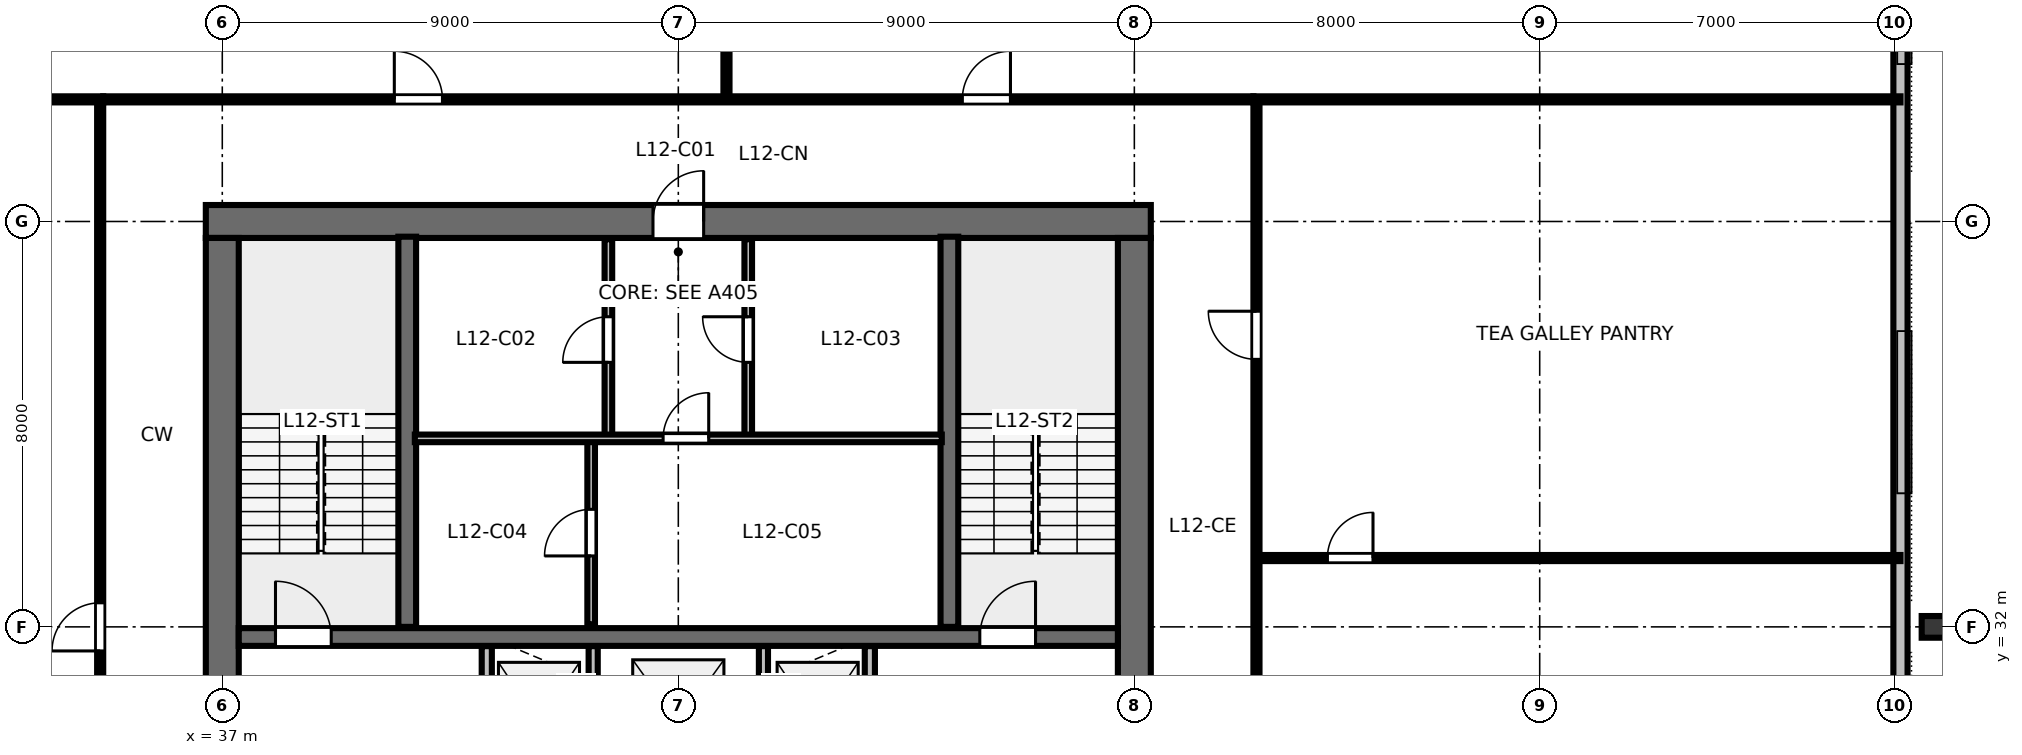
"""IFC4 building model, lengths in metres.
Left out: names, types, materials, properties, quantities, classifications, styles, units other than length and angle.
Written with IfcOpenShell. Run it as: python <this file> out.ifc"""

import sys

from ifc_helpers import new_model, si_unit, direction, frame, frame_2d, origin, origin_2d, place, context, subcontext, project, spatial, rectangle, i_section, extrude, element, fill, save


model = new_model("IFC4")
c1 = context("Model", 3, precision=1e-05, world=origin(), true_north=direction((0.0, 1.0)))
c2 = subcontext(c1, "Body", "Model", "MODEL_VIEW")
j1 = project(units=[si_unit("LENGTHUNIT", "METRE"), si_unit("PLANEANGLEUNIT", "RADIAN")], contexts=[c1])
p1 = place(None, origin())
s1 = spatial("IfcSite", under=j1, at=p1, CompositionType="ELEMENT")
p2 = place(p1, origin())
s2 = spatial("IfcBuilding", under=s1, at=p2, CompositionType="ELEMENT")
p3 = place(p2, frame((0.0, 0.0, 49.6)))
s3 = spatial("IfcBuildingStorey", under=s2, at=p3, CompositionType="ELEMENT", Elevation=49.6)
p4 = place(p3, frame((36.675, 40.0, 0.0), z_axis=(0.0, 0.0, 1.0), x_axis=(1.0, 0.0, 0.0)))
e1 = element("IfcWall", 1, at=p4, inside=s3, PredefinedType="SHEAR", context=c2, shape_type="SweptSolid", body=[
    extrude(rectangle(XDim=18.65, YDim=0.65, at=frame_2d((9.325, 0.0))), origin(), (0.0, 0.0, 1.0), 3.36),
])
p5 = place(p4, frame((8.825, 0.0, 0.0)))
e2 = element("IfcOpeningElement", 2, at=p5, cuts=e1, PredefinedType="OPENING", context=c2, shape_type="SweptSolid", body=[
    extrude(rectangle(XDim=1.0, YDim=2.15, at=frame_2d((0.5, 1.075))), frame((0.0, 0.335, 0.0), z_axis=(0.0, -1.0, 0.0), x_axis=(1.0, 0.0, 0.0)), (0.0, 0.0, 1.0), 0.67),
])
p6 = place(p3, frame((37.0, 24.325, 0.0), z_axis=(0.0, 0.0, 1.0), x_axis=(0.0, 1.0, 0.0)))
e3 = element("IfcWall", 3, at=p6, inside=s3, PredefinedType="SHEAR", context=c2, shape_type="SweptSolid", body=[
    extrude(rectangle(XDim=15.35, YDim=0.65, at=frame_2d((7.675, 0.0))), origin(), (0.0, 0.0, 1.0), 3.36),
])
p7 = place(p6, frame((5.2, 0.0, 0.0)))
e4 = element("IfcOpeningElement", 4, at=p7, cuts=e3, PredefinedType="OPENING", context=c2, shape_type="SweptSolid", body=[
    extrude(rectangle(XDim=1.15, YDim=2.15, at=frame_2d((0.575, 1.075))), frame((0.0, 0.335, 0.0), z_axis=(0.0, -1.0, 0.0), x_axis=(1.0, 0.0, 0.0)), (0.0, 0.0, 1.0), 0.67),
])
p8 = place(p3, frame((55.0, 24.325, 0.0), z_axis=(0.0, 0.0, 1.0), x_axis=(0.0, 1.0, 0.0)))
e5 = element("IfcWall", 5, at=p8, inside=s3, PredefinedType="SHEAR", context=c2, shape_type="SweptSolid", body=[
    extrude(rectangle(XDim=15.35, YDim=0.65, at=frame_2d((7.675, 0.0))), origin(), (0.0, 0.0, 1.0), 3.36),
])
p9 = place(p8, frame((5.2, 0.0, 0.0)))
e6 = element("IfcOpeningElement", 6, at=p9, cuts=e5, PredefinedType="OPENING", context=c2, shape_type="SweptSolid", body=[
    extrude(rectangle(XDim=1.15, YDim=2.15, at=frame_2d((0.575, 1.075))), frame((0.0, 0.335, 0.0), z_axis=(0.0, -1.0, 0.0), x_axis=(1.0, 0.0, 0.0)), (0.0, 0.0, 1.0), 0.67),
])
p10 = place(p3, frame((37.325, 31.8, 0.0), z_axis=(0.0, 0.0, 1.0), x_axis=(1.0, 0.0, 0.0)))
e7 = element("IfcWall", 7, at=p10, inside=s3, PredefinedType="SHEAR", context=c2, shape_type="SweptSolid", body=[
    extrude(rectangle(XDim=17.35, YDim=0.35, at=frame_2d((8.675, 0.0))), origin(), (0.0, 0.0, 1.0), 3.36),
])
p11 = place(p10, frame((0.725, 0.0, 0.0)))
e8 = element("IfcOpeningElement", 8, at=p11, cuts=e7, PredefinedType="OPENING", context=c2, shape_type="SweptSolid", body=[
    extrude(rectangle(XDim=1.1, YDim=2.15, at=frame_2d((0.55, 1.075))), frame((0.0, 0.185, 0.0), z_axis=(0.0, -1.0, 0.0), x_axis=(1.0, 0.0, 0.0)), (0.0, 0.0, 1.0), 0.37),
])
p12 = place(p10, frame((14.625, 0.0, 0.0)))
e9 = element("IfcOpeningElement", 9, at=p12, cuts=e7, PredefinedType="OPENING", context=c2, shape_type="SweptSolid", body=[
    extrude(rectangle(XDim=1.1, YDim=2.15, at=frame_2d((0.55, 1.075))), frame((0.0, 0.185, 0.0), z_axis=(0.0, -1.0, 0.0), x_axis=(1.0, 0.0, 0.0)), (0.0, 0.0, 1.0), 0.37),
])
p13 = place(p3, frame((70.78, 32.0, 0.0), z_axis=(0.0, 0.0, 1.0), x_axis=(0.0, 1.0, 0.0)))
e10 = element("IfcColumn", 10, at=p13, inside=s3, PredefinedType="COLUMN", context=c2, shape_type="SweptSolid", body=[
    extrude(i_section(OverallWidth=0.428, OverallDepth=0.483, WebThickness=0.051, FlangeThickness=0.082, FilletRadius=0.025, at=origin_2d()), origin(), (0.0, 0.0, 1.0), 3.358),
])
p14 = place(p3, frame((70.12, 14.16, 0.0), z_axis=(0.0, 0.0, 1.0), x_axis=(0.0, 1.0, 0.0)))
e11 = element("IfcWall", 11, at=p14, inside=s3, PredefinedType="STANDARD", context=c2, shape_type="SweptSolid", body=[
    extrude(rectangle(XDim=35.68, YDim=0.28, at=frame_2d((17.84, 0.0))), origin(), (0.0, 0.0, 1.0), 3.36),
])
for number, where, z_axis, x_axis in (
    (12, (40.65, 32.0, 0.0), (0.0, 0.0, 1.0), (0.0, 1.0, 0.0)),
    (13, (51.35, 32.0, 0.0), (0.0, 0.0, 1.0), (0.0, 1.0, 0.0)),
):
    element("IfcWall", number, at=place(p3, frame(where, z_axis=z_axis, x_axis=x_axis)), inside=s3, PredefinedType="SHEAR", context=c2, shape_type="SweptSolid", body=[
        extrude(rectangle(XDim=7.7, YDim=0.35, at=frame_2d((3.85, 0.0))), origin(), (0.0, 0.0, 1.0), 3.6),
    ])
p15 = place(p3, frame((44.62, 35.72, 0.0), z_axis=(0.0, 0.0, 1.0), x_axis=(0.0, 1.0, 0.0)))
e14 = element("IfcWall", 14, at=p15, inside=s3, PredefinedType="PARTITIONING", context=c2, shape_type="SweptSolid", body=[
    extrude(rectangle(XDim=3.93, YDim=0.15, at=frame_2d((1.965, 0.0))), origin(), (0.0, 0.0, 1.0), 3.36),
])
p16 = place(p15, frame((1.5, 0.0, 0.0)))
e15 = element("IfcOpeningElement", 15, at=p16, cuts=e14, PredefinedType="OPENING", context=c2, shape_type="SweptSolid", body=[
    extrude(rectangle(XDim=0.9, YDim=2.15, at=frame_2d((0.45, 1.075))), frame((0.0, 0.085, 0.0), z_axis=(0.0, -1.0, 0.0), x_axis=(1.0, 0.0, 0.0)), (0.0, 0.0, 1.0), 0.17),
])
p17 = place(p3, frame((47.38, 35.72, 0.0), z_axis=(0.0, 0.0, 1.0), x_axis=(0.0, 1.0, 0.0)))
e16 = element("IfcWall", 16, at=p17, inside=s3, PredefinedType="PARTITIONING", context=c2, shape_type="SweptSolid", body=[
    extrude(rectangle(XDim=3.93, YDim=0.15, at=frame_2d((1.965, 0.0))), origin(), (0.0, 0.0, 1.0), 3.36),
])
p18 = place(p17, frame((1.5, 0.0, 0.0)))
e17 = element("IfcOpeningElement", 17, at=p18, cuts=e16, PredefinedType="OPENING", context=c2, shape_type="SweptSolid", body=[
    extrude(rectangle(XDim=0.9, YDim=2.15, at=frame_2d((0.45, 1.075))), frame((0.0, 0.085, 0.0), z_axis=(0.0, -1.0, 0.0), x_axis=(1.0, 0.0, 0.0)), (0.0, 0.0, 1.0), 0.17),
])
p19 = place(p3, frame((44.28, 32.05, 0.0), z_axis=(0.0, 0.0, 1.0), x_axis=(0.0, 1.0, 0.0)))
e18 = element("IfcWall", 18, at=p19, inside=s3, PredefinedType="PARTITIONING", context=c2, shape_type="SweptSolid", body=[
    extrude(rectangle(XDim=3.67, YDim=0.15, at=frame_2d((1.835, 0.0))), origin(), (0.0, 0.0, 1.0), 3.36),
])
p20 = place(p19, frame((1.35, 0.0, 0.0)))
e19 = element("IfcOpeningElement", 19, at=p20, cuts=e18, PredefinedType="OPENING", context=c2, shape_type="SweptSolid", body=[
    extrude(rectangle(XDim=0.92, YDim=2.15, at=frame_2d((0.46, 1.075))), frame((0.0, 0.085, 0.0), z_axis=(0.0, -1.0, 0.0), x_axis=(1.0, 0.0, 0.0)), (0.0, 0.0, 1.0), 0.17),
])
p21 = place(p3, frame((40.8, 35.72, 0.0), z_axis=(0.0, 0.0, 1.0), x_axis=(1.0, 0.0, 0.0)))
e20 = element("IfcWall", 20, at=p21, inside=s3, PredefinedType="PARTITIONING", context=c2, shape_type="SweptSolid", body=[
    extrude(rectangle(XDim=10.4, YDim=0.15, at=frame_2d((5.2, 0.0))), origin(), (0.0, 0.0, 1.0), 3.36),
])
p22 = place(p21, frame((4.9, 0.0, 0.0)))
e21 = element("IfcOpeningElement", 21, at=p22, cuts=e20, PredefinedType="OPENING", context=c2, shape_type="SweptSolid", body=[
    extrude(rectangle(XDim=0.9, YDim=2.15, at=frame_2d((0.45, 1.075))), frame((0.0, 0.085, 0.0), z_axis=(0.0, -1.0, 0.0), x_axis=(1.0, 0.0, 0.0)), (0.0, 0.0, 1.0), 0.17),
])
p23 = place(p3, frame((42.22, 28.58, 0.0), z_axis=(0.0, 0.0, 1.0), x_axis=(0.0, 1.0, 0.0)))
e22 = element("IfcWall", 22, at=p23, inside=s3, PredefinedType="PARTITIONING", context=c2, shape_type="SweptSolid", body=[
    extrude(rectangle(XDim=3.04, YDim=0.2, at=frame_2d((1.52, 0.0))), origin(), (0.0, 0.0, 1.0), 3.36),
])
p24 = place(p23, frame((0.95, 0.0, 0.0)))
e23 = element("IfcOpeningElement", 23, at=p24, cuts=e22, PredefinedType="OPENING", context=c2, shape_type="SweptSolid", body=[
    extrude(rectangle(XDim=1.05, YDim=2.15, at=frame_2d((0.525, 1.075))), frame((0.0, 0.11, 0.0), z_axis=(0.0, -1.0, 0.0), x_axis=(1.0, 0.0, 0.0)), (0.0, 0.0, 1.0), 0.22),
])
p25 = place(p3, frame((49.78, 28.58, 0.0), z_axis=(0.0, 0.0, 1.0), x_axis=(0.0, 1.0, 0.0)))
e24 = element("IfcWall", 24, at=p25, inside=s3, PredefinedType="PARTITIONING", context=c2, shape_type="SweptSolid", body=[
    extrude(rectangle(XDim=3.04, YDim=0.2, at=frame_2d((1.52, 0.0))), origin(), (0.0, 0.0, 1.0), 3.36),
])
p26 = place(p25, frame((0.95, 0.0, 0.0)))
e25 = element("IfcOpeningElement", 25, at=p26, cuts=e24, PredefinedType="OPENING", context=c2, shape_type="SweptSolid", body=[
    extrude(rectangle(XDim=1.05, YDim=2.15, at=frame_2d((0.525, 1.075))), frame((0.0, 0.11, 0.0), z_axis=(0.0, -1.0, 0.0), x_axis=(1.0, 0.0, 0.0)), (0.0, 0.0, 1.0), 0.22),
])
for number, where, z_axis, x_axis in (
    (26, (44.32, 28.58, 0.0), (0.0, 0.0, 1.0), (0.0, 1.0, 0.0)),
    (27, (47.68, 28.58, 0.0), (0.0, 0.0, 1.0), (0.0, 1.0, 0.0)),
):
    element("IfcWall", number, at=place(p3, frame(where, z_axis=z_axis, x_axis=x_axis)), inside=s3, PredefinedType="PARTITIONING", context=c2, shape_type="SweptSolid", body=[
        extrude(rectangle(XDim=3.04, YDim=0.18, at=frame_2d((1.52, 0.0))), origin(), (0.0, 0.0, 1.0), 3.36),
    ])
p27 = place(p3, frame((46.95, 42.41, 0.0), z_axis=(0.0, 0.0, 1.0), x_axis=(0.0, 1.0, 0.0)))
e28 = element("IfcWall", 28, at=p27, inside=s3, PredefinedType="PARTITIONING", context=c2, shape_type="SweptSolid", body=[
    extrude(rectangle(XDim=10.81, YDim=0.12, at=frame_2d((5.405, 0.0))), origin(), (0.0, 0.0, 1.0), 2.64),
])
p28 = place(p27, frame((1.4, 0.0, 0.0)))
e29 = element("IfcOpeningElement", 29, at=p28, cuts=e28, PredefinedType="OPENING", context=c2, shape_type="SweptSolid", body=[
    extrude(rectangle(XDim=0.9, YDim=2.15, at=frame_2d((0.45, 1.075))), frame((0.0, 0.07, 0.0), z_axis=(0.0, -1.0, 0.0), x_axis=(1.0, 0.0, 0.0)), (0.0, 0.0, 1.0), 0.14),
])
p29 = place(p3, frame((34.65, 42.41, 0.0), z_axis=(0.0, 0.0, 1.0), x_axis=(1.0, 0.0, 0.0)))
e30 = element("IfcWall", 30, at=p29, inside=s3, PredefinedType="PARTITIONING", context=c2, shape_type="SweptSolid", body=[
    extrude(rectangle(XDim=22.7, YDim=0.12, at=frame_2d((11.35, 0.0))), origin(), (0.0, 0.0, 1.0), 2.64),
])
p30 = place(p29, frame((5.745, 0.0, 0.0)))
e31 = element("IfcOpeningElement", 31, at=p30, cuts=e30, PredefinedType="OPENING", context=c2, shape_type="SweptSolid", body=[
    extrude(rectangle(XDim=0.95, YDim=2.15, at=frame_2d((0.475, 1.075))), frame((0.0, 0.07, 0.0), z_axis=(0.0, -1.0, 0.0), x_axis=(1.0, 0.0, 0.0)), (0.0, 0.0, 1.0), 0.14),
])
p31 = place(p29, frame((16.955, 0.0, 0.0)))
e32 = element("IfcOpeningElement", 32, at=p31, cuts=e30, PredefinedType="OPENING", context=c2, shape_type="SweptSolid", body=[
    extrude(rectangle(XDim=0.95, YDim=2.15, at=frame_2d((0.475, 1.075))), frame((0.0, 0.07, 0.0), z_axis=(0.0, -1.0, 0.0), x_axis=(1.0, 0.0, 0.0)), (0.0, 0.0, 1.0), 0.14),
])
p32 = place(p3, frame((34.59, 21.65, 0.0), z_axis=(0.0, 0.0, 1.0), x_axis=(0.0, 1.0, 0.0)))
e33 = element("IfcWall", 33, at=p32, inside=s3, PredefinedType="PARTITIONING", context=c2, shape_type="SweptSolid", body=[
    extrude(rectangle(XDim=20.7, YDim=0.12, at=frame_2d((10.35, 0.0))), origin(), (0.0, 0.0, 1.0), 2.64),
])
p33 = place(p32, frame((9.875, 0.0, 0.0)))
e34 = element("IfcOpeningElement", 34, at=p33, cuts=e33, PredefinedType="OPENING", context=c2, shape_type="SweptSolid", body=[
    extrude(rectangle(XDim=0.95, YDim=2.15, at=frame_2d((0.475, 1.075))), frame((0.0, 0.07, 0.0), z_axis=(0.0, -1.0, 0.0), x_axis=(1.0, 0.0, 0.0)), (0.0, 0.0, 1.0), 0.14),
])
p34 = place(p3, frame((57.41, 33.358, 0.0), z_axis=(0.0, 0.0, 1.0), x_axis=(1.0, 0.0, 0.0)))
e35 = element("IfcWall", 35, at=p34, inside=s3, PredefinedType="PARTITIONING", context=c2, shape_type="SweptSolid", body=[
    extrude(rectangle(XDim=12.71, YDim=0.12, at=frame_2d((6.355, 0.0))), origin(), (0.0, 0.0, 1.0), 2.64),
])
p35 = place(p34, frame((1.4, 0.0, 0.0)))
e36 = element("IfcOpeningElement", 36, at=p35, cuts=e35, PredefinedType="OPENING", context=c2, shape_type="SweptSolid", body=[
    extrude(rectangle(XDim=0.9, YDim=2.15, at=frame_2d((0.45, 1.075))), frame((0.0, 0.07, 0.0), z_axis=(0.0, -1.0, 0.0), x_axis=(1.0, 0.0, 0.0)), (0.0, 0.0, 1.0), 0.14),
])
p36 = place(p3, frame((57.41, 21.65, 0.0), z_axis=(0.0, 0.0, 1.0), x_axis=(0.0, 1.0, 0.0)))
e37 = element("IfcWall", 37, at=p36, inside=s3, PredefinedType="PARTITIONING", context=c2, shape_type="SweptSolid", body=[
    extrude(rectangle(XDim=20.7, YDim=0.12, at=frame_2d((10.35, 0.0))), origin(), (0.0, 0.0, 1.0), 2.64),
])
p37 = place(p36, frame((5.479, 0.0, 0.0)))
e38 = element("IfcOpeningElement", 38, at=p37, cuts=e37, PredefinedType="OPENING", context=c2, shape_type="SweptSolid", body=[
    extrude(rectangle(XDim=0.95, YDim=2.15, at=frame_2d((0.475, 1.075))), frame((0.0, 0.07, 0.0), z_axis=(0.0, -1.0, 0.0), x_axis=(1.0, 0.0, 0.0)), (0.0, 0.0, 1.0), 0.14),
])
p38 = place(p36, frame((15.629, 0.0, 0.0)))
e39 = element("IfcOpeningElement", 39, at=p38, cuts=e37, PredefinedType="OPENING", context=c2, shape_type="SweptSolid", body=[
    extrude(rectangle(XDim=0.95, YDim=2.15, at=frame_2d((0.475, 1.075))), frame((0.0, 0.07, 0.0), z_axis=(0.0, -1.0, 0.0), x_axis=(1.0, 0.0, 0.0)), (0.0, 0.0, 1.0), 0.14),
])
for number, where, z_axis, x_axis in (
    (40, (34.65, 42.41, 0.0), (0.0, 0.0, 1.0), (-1.0, 0.0, 0.0)),
    (41, (57.35, 42.41, 0.0), (0.0, 0.0, 1.0), (1.0, 0.0, 0.0)),
):
    element("IfcWall", number, at=place(p3, frame(where, z_axis=z_axis, x_axis=x_axis)), inside=s3, PredefinedType="PARTITIONING", context=c2, shape_type="SweptSolid", body=[
        extrude(rectangle(XDim=12.77, YDim=0.12, at=frame_2d((6.385, 0.0))), origin(), (0.0, 0.0, 1.0), 2.64),
    ])
p39 = place(p11, origin())
e42 = element("IfcDoor", 42, at=p39, inside=s3, OperationType="SINGLE_SWING_LEFT", PredefinedType="DOOR", context=c2, shape_type="SweptSolid", body=[
    extrude(rectangle(XDim=1.1, YDim=2.15, at=frame_2d((0.55, 1.075))), frame((0.0, 0.025, 0.0), z_axis=(0.0, -1.0, 0.0), x_axis=(1.0, 0.0, 0.0)), (0.0, 0.0, 1.0), 0.05),
])
fill(e8, e42)
p40 = place(p12, origin())
e43 = element("IfcDoor", 43, at=p40, inside=s3, OperationType="SINGLE_SWING_RIGHT", PredefinedType="DOOR", context=c2, shape_type="SweptSolid", body=[
    extrude(rectangle(XDim=1.1, YDim=2.15, at=frame_2d((0.55, 1.075))), frame((0.0, 0.025, 0.0), z_axis=(0.0, -1.0, 0.0), x_axis=(1.0, 0.0, 0.0)), (0.0, 0.0, 1.0), 0.05),
])
fill(e9, e43)
p41 = place(p5, origin())
e44 = element("IfcDoor", 44, at=p41, inside=s3, OperationType="SINGLE_SWING_RIGHT", PredefinedType="DOOR", context=c2, shape_type="SweptSolid", body=[
    extrude(rectangle(XDim=1.0, YDim=2.15, at=frame_2d((0.5, 1.075))), frame((0.0, 0.025, 0.0), z_axis=(0.0, -1.0, 0.0), x_axis=(1.0, 0.0, 0.0)), (0.0, 0.0, 1.0), 0.05),
])
fill(e2, e44)
p42 = place(p16, origin())
e45 = element("IfcDoor", 45, at=p42, inside=s3, OperationType="SINGLE_SWING_LEFT", PredefinedType="DOOR", context=c2, shape_type="SweptSolid", body=[
    extrude(rectangle(XDim=0.9, YDim=2.15, at=frame_2d((0.45, 1.075))), frame((0.0, 0.025, 0.0), z_axis=(0.0, -1.0, 0.0), x_axis=(1.0, 0.0, 0.0)), (0.0, 0.0, 1.0), 0.05),
])
fill(e15, e45)
p43 = place(p18, origin())
e46 = element("IfcDoor", 46, at=p43, inside=s3, OperationType="SINGLE_SWING_RIGHT", PredefinedType="DOOR", context=c2, shape_type="SweptSolid", body=[
    extrude(rectangle(XDim=0.9, YDim=2.15, at=frame_2d((0.45, 1.075))), frame((0.0, 0.025, 0.0), z_axis=(0.0, -1.0, 0.0), x_axis=(1.0, 0.0, 0.0)), (0.0, 0.0, 1.0), 0.05),
])
fill(e17, e46)
p44 = place(p20, origin())
e47 = element("IfcDoor", 47, at=p44, inside=s3, OperationType="SINGLE_SWING_LEFT", PredefinedType="DOOR", context=c2, shape_type="SweptSolid", body=[
    extrude(rectangle(XDim=0.92, YDim=2.15, at=frame_2d((0.46, 1.075))), frame((0.0, 0.025, 0.0), z_axis=(0.0, -1.0, 0.0), x_axis=(1.0, 0.0, 0.0)), (0.0, 0.0, 1.0), 0.05),
])
fill(e19, e47)
p45 = place(p22, origin())
e48 = element("IfcDoor", 48, at=p45, inside=s3, OperationType="SINGLE_SWING_RIGHT", PredefinedType="DOOR", context=c2, shape_type="SweptSolid", body=[
    extrude(rectangle(XDim=0.9, YDim=2.15, at=frame_2d((0.45, 1.075))), frame((0.0, 0.025, 0.0), z_axis=(0.0, -1.0, 0.0), x_axis=(1.0, 0.0, 0.0)), (0.0, 0.0, 1.0), 0.05),
])
fill(e21, e48)
p46 = place(p30, origin())
e49 = element("IfcDoor", 49, at=p46, inside=s3, OperationType="SINGLE_SWING_LEFT", PredefinedType="DOOR", context=c2, shape_type="SweptSolid", body=[
    extrude(rectangle(XDim=0.95, YDim=2.15, at=frame_2d((0.475, 1.075))), frame((0.0, 0.025, 0.0), z_axis=(0.0, -1.0, 0.0), x_axis=(1.0, 0.0, 0.0)), (0.0, 0.0, 1.0), 0.05),
])
fill(e31, e49)
p47 = place(p31, origin())
e50 = element("IfcDoor", 50, at=p47, inside=s3, OperationType="SINGLE_SWING_RIGHT", PredefinedType="DOOR", context=c2, shape_type="SweptSolid", body=[
    extrude(rectangle(XDim=0.95, YDim=2.15, at=frame_2d((0.475, 1.075))), frame((0.0, 0.025, 0.0), z_axis=(0.0, -1.0, 0.0), x_axis=(1.0, 0.0, 0.0)), (0.0, 0.0, 1.0), 0.05),
])
fill(e32, e50)
p48 = place(p33, origin())
e51 = element("IfcDoor", 51, at=p48, inside=s3, OperationType="SINGLE_SWING_LEFT", PredefinedType="DOOR", context=c2, shape_type="SweptSolid", body=[
    extrude(rectangle(XDim=0.95, YDim=2.15, at=frame_2d((0.475, 1.075))), frame((0.0, 0.025, 0.0), z_axis=(0.0, -1.0, 0.0), x_axis=(1.0, 0.0, 0.0)), (0.0, 0.0, 1.0), 0.05),
])
fill(e34, e51)
p49 = place(p35, origin())
e52 = element("IfcDoor", 52, at=p49, inside=s3, OperationType="SINGLE_SWING_RIGHT", PredefinedType="DOOR", context=c2, shape_type="SweptSolid", body=[
    extrude(rectangle(XDim=0.9, YDim=2.15, at=frame_2d((0.45, 1.075))), frame((0.0, 0.025, 0.0), z_axis=(0.0, -1.0, 0.0), x_axis=(1.0, 0.0, 0.0)), (0.0, 0.0, 1.0), 0.05),
])
fill(e36, e52)
p50 = place(p38, origin())
e53 = element("IfcDoor", 53, at=p50, inside=s3, OperationType="SINGLE_SWING_RIGHT", PredefinedType="DOOR", context=c2, shape_type="SweptSolid", body=[
    extrude(rectangle(XDim=0.95, YDim=2.15, at=frame_2d((0.475, 1.075))), frame((0.0, 0.025, 0.0), z_axis=(0.0, -1.0, 0.0), x_axis=(1.0, 0.0, 0.0)), (0.0, 0.0, 1.0), 0.05),
])
fill(e39, e53)
save(model, sys.argv[1])
